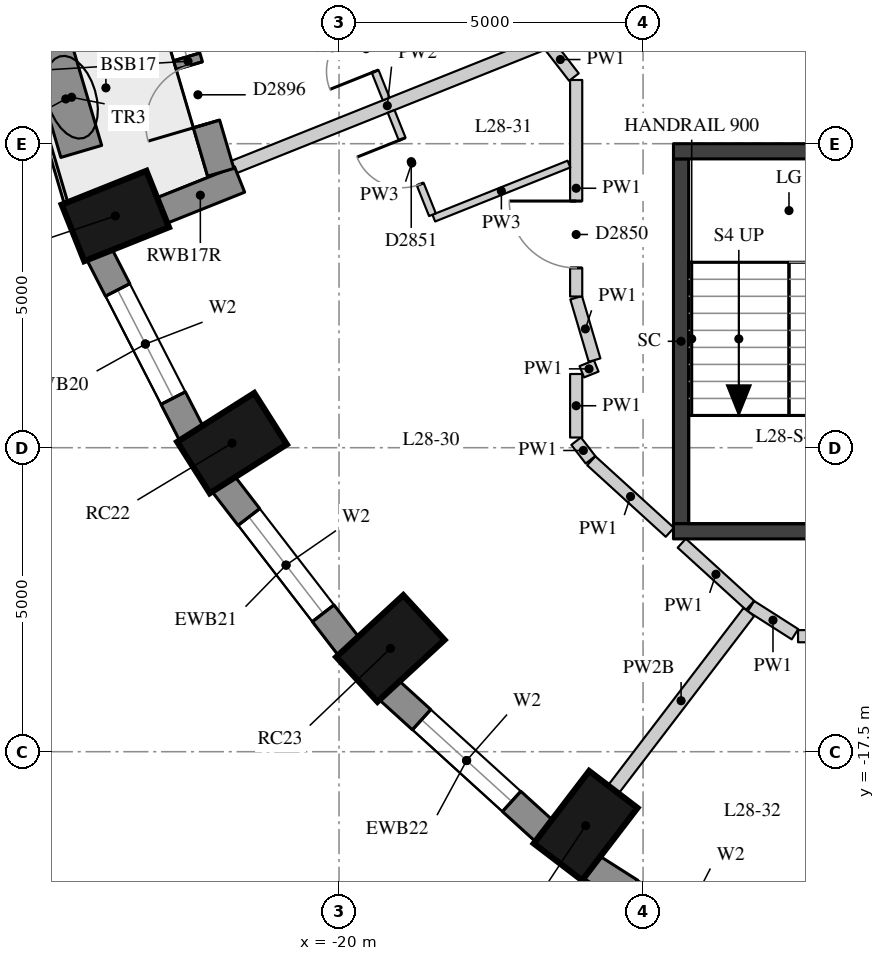
"""IFC4 building model, lengths in metres.
Left out: names, types, materials, properties, quantities, classifications, styles, units other than length and angle.
Written with IfcOpenShell. Run it as: python <this file> out.ifc"""

import sys

from ifc_helpers import new_model, si_unit, direction, frame, frame_2d, origin, origin_2d, place, context, subcontext, project, spatial, rectangle, extrude, element, fill, save


model = new_model("IFC4")
c1 = context("Model", 3, precision=1e-05, world=origin(), true_north=direction((0.0, 1.0)))
c2 = subcontext(c1, "Body", "Model", "MODEL_VIEW")
j1 = project(units=[si_unit("LENGTHUNIT", "METRE"), si_unit("PLANEANGLEUNIT", "RADIAN")], contexts=[c1])
p1 = place(None, origin())
s1 = spatial("IfcSite", under=j1, at=p1, CompositionType="ELEMENT")
p2 = place(p1, origin())
s2 = spatial("IfcBuilding", under=s1, at=p2, CompositionType="ELEMENT")
p3 = place(p2, frame((0.0, 0.0, 102.1)))
s3 = spatial("IfcBuildingStorey", under=s2, at=p3, CompositionType="ELEMENT", Elevation=102.1)
for number, where, z_axis, x_axis in (
    (1, (-23.679, -8.689, 0.0), (0.0, 0.0, 1.0), (-0.929, -0.371, 0.0)),
    (2, (-21.76, -12.425, 0.0), (0.0, 0.0, 1.0), (-0.845, -0.536, 0.0)),
    (3, (-19.156, -15.802, 0.0), (0.0, 0.0, 1.0), (-0.735, -0.678, 0.0)),
    (4, (-15.945, -18.717, 0.0), (0.0, 0.0, 1.0), (-0.607, -0.795, 0.0)),
):
    element("IfcColumn", number, at=place(p3, frame(where, z_axis=z_axis, x_axis=x_axis)), inside=s3, PredefinedType="COLUMN", context=c2, shape_type="SweptSolid", body=[
        extrude(rectangle(XDim=1.5, YDim=1.0, at=origin_2d()), origin(), (0.0, 0.0, 1.0), 3.3),
    ])
p4 = place(p3, frame((-23.945, -9.312, 0.0), z_axis=(0.0, 0.0, 1.0), x_axis=(0.456828186229, -0.889554949549, 0.0)))
e5 = element("IfcWall", 5, at=p4, inside=s3, PredefinedType="SOLIDWALL", context=c2, shape_type="SweptSolid", body=[
    extrude(rectangle(XDim=3.333, YDim=0.45, at=frame_2d((1.667, 0.0))), origin(), (0.0, 0.0, 1.0), 3.02),
])
p5 = place(p4, frame((0.666, 0.0, 0.4)))
e6 = element("IfcOpeningElement", 6, at=p5, cuts=e5, PredefinedType="OPENING", context=c2, shape_type="SweptSolid", body=[
    extrude(rectangle(XDim=2.0, YDim=1.75, at=frame_2d((1.0, 0.875))), frame((0.0, 0.235, 0.0), z_axis=(0.0, -1.0, 0.0), x_axis=(1.0, 0.0, 0.0)), (0.0, 0.0, 1.0), 0.47),
])
p6 = place(p3, frame((-21.908, -13.087, 0.0), z_axis=(0.0, 0.0, 1.0), x_axis=(0.610693945156, -0.791866721961, 0.0)))
e7 = element("IfcWall", 7, at=p6, inside=s3, PredefinedType="SOLIDWALL", context=c2, shape_type="SweptSolid", body=[
    extrude(rectangle(XDim=3.395, YDim=0.45, at=frame_2d((1.697, 0.0))), origin(), (0.0, 0.0, 1.0), 3.02),
])
p7 = place(p6, frame((0.697, 0.0, 0.4)))
e8 = element("IfcOpeningElement", 8, at=p7, cuts=e7, PredefinedType="OPENING", context=c2, shape_type="SweptSolid", body=[
    extrude(rectangle(XDim=2.0, YDim=1.75, at=frame_2d((1.0, 0.875))), frame((0.0, 0.235, 0.0), z_axis=(0.0, -1.0, 0.0), x_axis=(1.0, 0.0, 0.0)), (0.0, 0.0, 1.0), 0.47),
])
p8 = place(p3, frame((-19.184, -16.481, 0.0), z_axis=(0.0, 0.0, 1.0), x_axis=(0.740364106106, -0.672206062446, 0.0)))
e9 = element("IfcWall", 9, at=p8, inside=s3, PredefinedType="SOLIDWALL", context=c2, shape_type="SweptSolid", body=[
    extrude(rectangle(XDim=3.464, YDim=0.45, at=frame_2d((1.732, 0.0))), origin(), (0.0, 0.0, 1.0), 3.02),
])
p9 = place(p8, frame((0.732, 0.0, 0.4)))
e10 = element("IfcOpeningElement", 10, at=p9, cuts=e9, PredefinedType="OPENING", context=c2, shape_type="SweptSolid", body=[
    extrude(rectangle(XDim=2.0, YDim=1.75, at=frame_2d((1.0, 0.875))), frame((0.0, 0.235, 0.0), z_axis=(0.0, -1.0, 0.0), x_axis=(1.0, 0.0, 0.0)), (0.0, 0.0, 1.0), 0.47),
])
p10 = place(p3, frame((-15.856, -19.392, 0.0), z_axis=(0.0, 0.0, 1.0), x_axis=(0.843891947083, -0.53651317006, 0.0)))
e11 = element("IfcWall", 11, at=p10, inside=s3, PredefinedType="SOLIDWALL", context=c2, shape_type="SweptSolid", body=[
    extrude(rectangle(XDim=3.532, YDim=0.45, at=frame_2d((1.766, 0.0))), origin(), (0.0, 0.0, 1.0), 3.02),
])
p11 = place(p10, frame((0.766, 0.0, 0.4)))
e12 = element("IfcOpeningElement", 12, at=p11, cuts=e11, PredefinedType="OPENING", context=c2, shape_type="SweptSolid", body=[
    extrude(rectangle(XDim=2.0, YDim=1.75, at=frame_2d((1.0, 0.875))), frame((0.0, 0.235, 0.0), z_axis=(0.0, -1.0, 0.0), x_axis=(1.0, 0.0, 0.0)), (0.0, 0.0, 1.0), 0.47),
])
p12 = place(p3, frame((-22.926, -8.605, 0.0), z_axis=(0.0, 0.0, 1.0), x_axis=(0.928549333349, 0.371209018665, 0.0)))
e13 = element("IfcWall", 13, at=p12, inside=s3, PredefinedType="SOLIDWALL", context=c2, shape_type="SweptSolid", body=[
    extrude(rectangle(XDim=1.39, YDim=0.45, at=frame_2d((0.695, 0.0))), origin(), (0.0, 0.0, 1.0), 3.02),
])
p13 = place(p3, frame((-23.021, -4.317, 0.0), z_axis=(0.0, 0.0, 1.0), x_axis=(0.282391916129, -0.959299122123, 0.0)))
e14 = element("IfcWall", 14, at=p13, inside=s3, PredefinedType="SOLIDWALL", context=c2, shape_type="SweptSolid", body=[
    extrude(rectangle(XDim=3.808, YDim=0.45, at=frame_2d((1.904, 0.0))), origin(), (0.0, 0.0, 1.0), 3.02),
])
p14 = place(p13, frame((0.829, 0.0, 0.4)))
e15 = element("IfcOpeningElement", 15, at=p14, cuts=e14, PredefinedType="OPENING", context=c2, shape_type="SweptSolid", body=[
    extrude(rectangle(XDim=1.0, YDim=1.75, at=frame_2d((0.5, 0.875))), frame((0.0, 0.235, 0.0), z_axis=(0.0, -1.0, 0.0), x_axis=(1.0, 0.0, 0.0)), (0.0, 0.0, 1.0), 0.47),
])
p15 = place(p13, frame((1.979, 0.0, 0.0)))
e16 = element("IfcOpeningElement", 16, at=p15, cuts=e14, PredefinedType="OPENING", context=c2, shape_type="SweptSolid", body=[
    extrude(rectangle(XDim=1.0, YDim=2.15, at=frame_2d((0.5, 1.075))), frame((0.0, 0.235, 0.0), z_axis=(0.0, -1.0, 0.0), x_axis=(1.0, 0.0, 0.0)), (0.0, 0.0, 1.0), 0.47),
])
p16 = place(p3, frame((-24.749, -5.901, 0.0), z_axis=(0.0, 0.0, 1.0), x_axis=(0.283076786659, -0.959097248904, 0.0)))
e17 = element("IfcWall", 17, at=p16, inside=s3, PredefinedType="USERDEFINED", context=c2, shape_type="SweptSolid", body=[
    extrude(rectangle(XDim=1.8, YDim=0.7, at=frame_2d((0.9, 0.0))), origin(), (0.0, 0.0, 1.0), 0.75),
])
p17 = place(p3, frame((-14.375, -13.75, -0.28), z_axis=(0.0, 0.0, 1.0), x_axis=(0.0, 1.0, 0.0)))
e18 = element("IfcWall", 18, at=p17, inside=s3, PredefinedType="SHEAR", context=c2, shape_type="SweptSolid", body=[
    extrude(rectangle(XDim=6.0, YDim=0.25, at=frame_2d((3.0, 0.0))), origin(), (0.0, 0.0, 1.0), 3.3),
])
for number, where, z_axis, x_axis in (
    (19, (-14.5, -7.625, -0.28), (0.0, 0.0, 1.0), (1.0, 0.0, 0.0)),
    (20, (-14.5, -13.875, -0.28), (0.0, 0.0, 1.0), (1.0, 0.0, 0.0)),
):
    element("IfcWall", number, at=place(p3, frame(where, z_axis=z_axis, x_axis=x_axis)), inside=s3, PredefinedType="SHEAR", context=c2, shape_type="SweptSolid", body=[
        extrude(rectangle(XDim=5.2, YDim=0.25, at=frame_2d((2.6, 0.0))), origin(), (0.0, 0.0, 1.0), 3.3),
    ])
p18 = place(p3, frame((-14.56, -13.891, 0.0), z_axis=(0.0, 0.0, 1.0), x_axis=(-0.739440483737, 0.673221932954, 0.0)))
e21 = element("IfcWall", 21, at=p18, inside=s3, PredefinedType="PARTITIONING", context=c2, shape_type="SweptSolid", body=[
    extrude(rectangle(XDim=1.748, YDim=0.2, at=frame_2d((0.874, 0.0))), origin(), (0.0, 0.0, 1.0), 3.02),
])
p19 = place(p3, frame((-15.864, -12.699, 0.0), z_axis=(0.0, 0.0, 1.0), x_axis=(-0.61004607296, 0.792365943782, 0.0)))
e22 = element("IfcWall", 22, at=p19, inside=s3, PredefinedType="PARTITIONING", context=c2, shape_type="SweptSolid", body=[
    extrude(rectangle(XDim=0.387, YDim=0.2, at=frame_2d((0.193, 0.0))), origin(), (0.0, 0.0, 1.0), 3.02),
])
p20 = place(p3, frame((-16.1, -12.332, 0.0), z_axis=(0.0, 0.0, 1.0), x_axis=(0.0, 1.0, 0.0)))
e23 = element("IfcWall", 23, at=p20, inside=s3, PredefinedType="PARTITIONING", context=c2, shape_type="SweptSolid", body=[
    extrude(rectangle(XDim=1.045, YDim=0.2, at=frame_2d((0.522, 0.0))), origin(), (0.0, 0.0, 1.0), 3.02),
])
p21 = place(p3, frame((-16.007, -11.251, 0.0), z_axis=(0.0, 0.0, 1.0), x_axis=(0.928016011931, 0.372540308691, 0.0)))
e24 = element("IfcWall", 24, at=p21, inside=s3, PredefinedType="PARTITIONING", context=c2, shape_type="SweptSolid", body=[
    extrude(rectangle(XDim=0.256, YDim=0.2, at=frame_2d((0.128, 0.0))), origin(), (0.0, 0.0, 1.0), 3.02),
])
p22 = place(p3, frame((-15.798, -11.059, 0.0), z_axis=(0.0, 0.0, 1.0), x_axis=(-0.282883185669, 0.959154368841, 0.0)))
e25 = element("IfcWall", 25, at=p22, inside=s3, PredefinedType="PARTITIONING", context=c2, shape_type="SweptSolid", body=[
    extrude(rectangle(XDim=1.069, YDim=0.2, at=frame_2d((0.535, 0.0))), origin(), (0.0, 0.0, 1.0), 3.02),
])
p23 = place(p3, frame((-16.1, -10.013, 0.0), z_axis=(0.0, 0.0, 1.0), x_axis=(0.0, 1.0, 0.0)))
e26 = element("IfcWall", 26, at=p23, inside=s3, PredefinedType="PARTITIONING", context=c2, shape_type="SweptSolid", body=[
    extrude(rectangle(XDim=3.561, YDim=0.2, at=frame_2d((1.781, 0.0))), origin(), (0.0, 0.0, 1.0), 3.02),
])
p24 = place(p23, frame((0.47, 0.0, 0.0)))
e27 = element("IfcOpeningElement", 27, at=p24, cuts=e26, PredefinedType="OPENING", context=c2, shape_type="SweptSolid", body=[
    extrude(rectangle(XDim=1.1, YDim=2.1, at=frame_2d((0.55, 1.05))), frame((0.0, 0.11, 0.0), z_axis=(0.0, -1.0, 0.0), x_axis=(1.0, 0.0, 0.0)), (0.0, 0.0, 1.0), 0.22),
])
p25 = place(p3, frame((-16.137, -6.405, 0.0), z_axis=(0.0, 0.0, 1.0), x_axis=(-0.612388914667, 0.790556650211, 0.0)))
e28 = element("IfcWall", 28, at=p25, inside=s3, PredefinedType="PARTITIONING", context=c2, shape_type="SweptSolid", body=[
    extrude(rectangle(XDim=0.73, YDim=0.2, at=frame_2d((0.365, 0.0))), origin(), (0.0, 0.0, 1.0), 3.02),
])
p26 = place(p3, frame((-8.0, -15.6, 0.0), z_axis=(0.0, 0.0, 1.0), x_axis=(-1.0, 0.0, 0.0)))
e29 = element("IfcWall", 29, at=p26, inside=s3, PredefinedType="PARTITIONING", context=c2, shape_type="SweptSolid", body=[
    extrude(rectangle(XDim=4.451, YDim=0.2, at=frame_2d((2.226, 0.0))), origin(), (0.0, 0.0, 1.0), 3.02),
])
p27 = place(p26, frame((2.442, 0.0, 0.0)))
e30 = element("IfcOpeningElement", 30, at=p27, cuts=e29, PredefinedType="OPENING", context=c2, shape_type="SweptSolid", body=[
    extrude(rectangle(XDim=0.9, YDim=2.1, at=frame_2d((0.45, 1.05))), frame((0.0, 0.11, 0.0), z_axis=(0.0, -1.0, 0.0), x_axis=(1.0, 0.0, 0.0)), (0.0, 0.0, 1.0), 0.22),
])
p28 = place(p3, frame((-12.501, -15.568, 0.0), z_axis=(0.0, 0.0, 1.0), x_axis=(-0.843169167706, 0.537648355926, 0.0)))
e31 = element("IfcWall", 31, at=p28, inside=s3, PredefinedType="PARTITIONING", context=c2, shape_type="SweptSolid", body=[
    extrude(rectangle(XDim=0.858, YDim=0.2, at=frame_2d((0.429, 0.0))), origin(), (0.0, 0.0, 1.0), 3.02),
])
p29 = place(p3, frame((-13.24, -15.093, 0.0), z_axis=(0.0, 0.0, 1.0), x_axis=(-0.739438095557, 0.673224556028, 0.0)))
e32 = element("IfcWall", 32, at=p29, inside=s3, PredefinedType="PARTITIONING", context=c2, shape_type="SweptSolid", body=[
    extrude(rectangle(XDim=1.519, YDim=0.2, at=frame_2d((0.76, 0.0))), origin(), (0.0, 0.0, 1.0), 3.02),
])
p30 = place(p3, frame((-21.736, -7.887, 0.0), z_axis=(0.0, 0.0, 1.0), x_axis=(0.928513770625, 0.371297963583, 0.0)))
e33 = element("IfcWall", 33, at=p30, inside=s3, PredefinedType="PARTITIONING", context=c2, shape_type="SweptSolid", body=[
    extrude(rectangle(XDim=5.448, YDim=0.22, at=frame_2d((2.724, 0.0))), origin(), (0.0, 0.0, 1.0), 3.02),
])
p31 = place(p3, frame((-15.489, -18.121, 0.0), z_axis=(0.0, 0.0, 1.0), x_axis=(0.607082337972, 0.794638933681, 0.0)))
e34 = element("IfcWall", 34, at=p31, inside=s3, PredefinedType="PARTITIONING", context=c2, shape_type="SweptSolid", body=[
    extrude(rectangle(XDim=3.672, YDim=0.22, at=frame_2d((1.836, 0.0))), origin(), (0.0, 0.0, 1.0), 2.57),
])
p32 = place(p3, frame((-16.219, -7.835, 0.0), z_axis=(0.0, 0.0, 1.0), x_axis=(-0.928532951542, -0.371249993806, 0.0)))
e35 = element("IfcWall", 35, at=p32, inside=s3, PredefinedType="PARTITIONING", context=c2, shape_type="SweptSolid", body=[
    extrude(rectangle(XDim=2.394, YDim=0.12, at=frame_2d((1.197, 0.0))), origin(), (0.0, 0.0, 1.0), 3.02),
])
p33 = place(p3, frame((-19.904, -5.065, 0.0), z_axis=(0.0, 0.0, 1.0), x_axis=(0.371275666236, -0.92852268667, 0.0)))
e36 = element("IfcWall", 36, at=p33, inside=s3, PredefinedType="PARTITIONING", context=c2, shape_type="SweptSolid", body=[
    extrude(rectangle(XDim=1.83, YDim=0.12, at=frame_2d((0.915, 0.0))), origin(), (0.0, 0.0, 1.0), 3.02),
])
p34 = place(p33, frame((0.54, 0.0, 0.0)))
e37 = element("IfcOpeningElement", 37, at=p34, cuts=e36, PredefinedType="OPENING", context=c2, shape_type="SweptSolid", body=[
    extrude(rectangle(XDim=0.8, YDim=2.1, at=frame_2d((0.4, 1.05))), frame((0.0, 0.07, 0.0), z_axis=(0.0, -1.0, 0.0), x_axis=(1.0, 0.0, 0.0)), (0.0, 0.0, 1.0), 0.14),
])
p35 = place(p3, frame((-18.464, -8.668, 0.0), z_axis=(0.0, 0.0, 1.0), x_axis=(-0.371275666236, 0.92852268667, 0.0)))
e38 = element("IfcWall", 38, at=p35, inside=s3, PredefinedType="PARTITIONING", context=c2, shape_type="SweptSolid", body=[
    extrude(rectangle(XDim=1.83, YDim=0.12, at=frame_2d((0.915, 0.0))), origin(), (0.0, 0.0, 1.0), 3.02),
])
p36 = place(p35, frame((0.54, 0.0, 0.0)))
e39 = element("IfcOpeningElement", 39, at=p36, cuts=e38, PredefinedType="OPENING", context=c2, shape_type="SweptSolid", body=[
    extrude(rectangle(XDim=0.8, YDim=2.1, at=frame_2d((0.4, 1.05))), frame((0.0, 0.07, 0.0), z_axis=(0.0, -1.0, 0.0), x_axis=(1.0, 0.0, 0.0)), (0.0, 0.0, 1.0), 0.14),
])
p37 = place(p5, origin())
e40 = element("IfcWindow", 40, at=p37, inside=s3, PartitioningType="SINGLE_PANEL", PredefinedType="WINDOW", context=c2, shape_type="SweptSolid", body=[
    extrude(rectangle(XDim=2.0, YDim=1.75, at=frame_2d((1.0, 0.875))), frame((0.0, 0.035, 0.0), z_axis=(0.0, -1.0, 0.0), x_axis=(1.0, 0.0, 0.0)), (0.0, 0.0, 1.0), 0.06),
])
fill(e6, e40)
p38 = place(p7, origin())
e41 = element("IfcWindow", 41, at=p38, inside=s3, PartitioningType="SINGLE_PANEL", PredefinedType="WINDOW", context=c2, shape_type="SweptSolid", body=[
    extrude(rectangle(XDim=2.0, YDim=1.75, at=frame_2d((1.0, 0.875))), frame((0.0, 0.035, 0.0), z_axis=(0.0, -1.0, 0.0), x_axis=(1.0, 0.0, 0.0)), (0.0, 0.0, 1.0), 0.06),
])
fill(e8, e41)
p39 = place(p9, origin())
e42 = element("IfcWindow", 42, at=p39, inside=s3, PartitioningType="SINGLE_PANEL", PredefinedType="WINDOW", context=c2, shape_type="SweptSolid", body=[
    extrude(rectangle(XDim=2.0, YDim=1.75, at=frame_2d((1.0, 0.875))), frame((0.0, 0.035, 0.0), z_axis=(0.0, -1.0, 0.0), x_axis=(1.0, 0.0, 0.0)), (0.0, 0.0, 1.0), 0.06),
])
fill(e10, e42)
p40 = place(p14, origin())
e43 = element("IfcWindow", 43, at=p40, inside=s3, PartitioningType="SINGLE_PANEL", PredefinedType="WINDOW", context=c2, shape_type="SweptSolid", body=[
    extrude(rectangle(XDim=1.0, YDim=1.75, at=frame_2d((0.5, 0.875))), frame((0.0, 0.035, 0.0), z_axis=(0.0, -1.0, 0.0), x_axis=(1.0, 0.0, 0.0)), (0.0, 0.0, 1.0), 0.06),
])
fill(e15, e43)
p41 = place(p15, frame((1.0, 0.0, 0.0), z_axis=(0.0, 0.0, 1.0), x_axis=(-1.0, 0.0, 0.0)))
e44 = element("IfcDoor", 44, at=p41, inside=s3, OperationType="SINGLE_SWING_LEFT", PredefinedType="DOOR", context=c2, shape_type="SweptSolid", body=[
    extrude(rectangle(XDim=1.0, YDim=2.15, at=frame_2d((0.5, 1.075))), frame((0.0, 0.075, 0.0), z_axis=(0.0, -1.0, 0.0), x_axis=(1.0, 0.0, 0.0)), (0.0, 0.0, 1.0), 0.05),
])
fill(e16, e44)
p42 = place(p34, origin())
e45 = element("IfcDoor", 45, at=p42, inside=s3, OperationType="SINGLE_SWING_LEFT", PredefinedType="DOOR", context=c2, shape_type="SweptSolid", body=[
    extrude(rectangle(XDim=0.8, YDim=2.1, at=frame_2d((0.4, 1.05))), frame((0.0, 0.025, 0.0), z_axis=(0.0, -1.0, 0.0), x_axis=(1.0, 0.0, 0.0)), (0.0, 0.0, 1.0), 0.05),
])
fill(e37, e45)
p43 = place(p24, origin())
e46 = element("IfcDoor", 46, at=p43, inside=s3, OperationType="SINGLE_SWING_RIGHT", PredefinedType="DOOR", context=c2, shape_type="SweptSolid", body=[
    extrude(rectangle(XDim=1.1, YDim=2.1, at=frame_2d((0.55, 1.05))), frame((0.0, 0.025, 0.0), z_axis=(0.0, -1.0, 0.0), x_axis=(1.0, 0.0, 0.0)), (0.0, 0.0, 1.0), 0.05),
])
fill(e27, e46)
p44 = place(p36, origin())
e47 = element("IfcDoor", 47, at=p44, inside=s3, OperationType="SINGLE_SWING_RIGHT", PredefinedType="DOOR", context=c2, shape_type="SweptSolid", body=[
    extrude(rectangle(XDim=0.8, YDim=2.1, at=frame_2d((0.4, 1.05))), frame((0.0, 0.025, 0.0), z_axis=(0.0, -1.0, 0.0), x_axis=(1.0, 0.0, 0.0)), (0.0, 0.0, 1.0), 0.05),
])
fill(e39, e47)
save(model, sys.argv[1])
